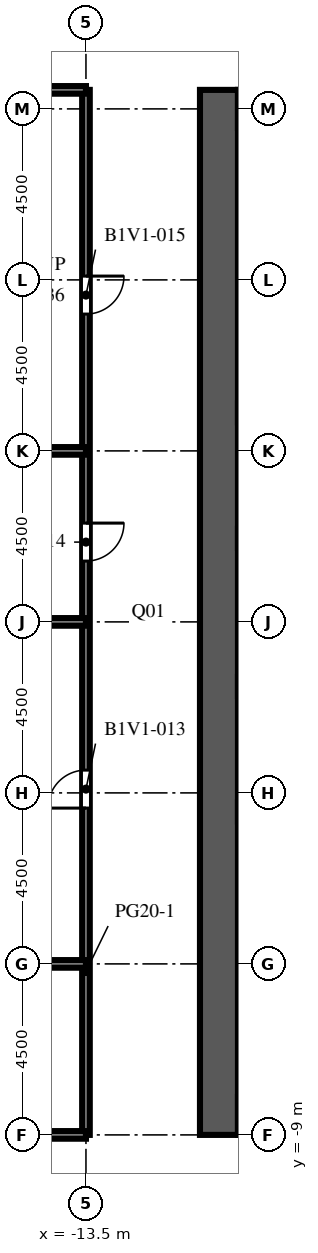
"""IFC4 building model, lengths in metres.
Left out: names, types, materials, properties, quantities, classifications, styles, units other than length and angle.
Written with IfcOpenShell. Run it as: python <this file> out.ifc"""

import sys

from ifc_helpers import new_model, si_unit, direction, frame, frame_2d, origin, place, context, subcontext, project, spatial, rectangle, extrude, element, fill, save


model = new_model("IFC4")
c1 = context("Model", 3, precision=1e-05, world=origin(), true_north=direction((0.0, 1.0)))
c2 = subcontext(c1, "Body", "Model", "MODEL_VIEW")
j1 = project(units=[si_unit("LENGTHUNIT", "METRE"), si_unit("PLANEANGLEUNIT", "RADIAN")], contexts=[c1])
p1 = place(None, origin())
s1 = spatial("IfcSite", under=j1, at=p1, CompositionType="ELEMENT")
p2 = place(p1, origin())
s2 = spatial("IfcBuilding", under=s1, at=p2, CompositionType="ELEMENT")
p3 = place(p2, frame((0.0, 0.0, 23.6)))
s3 = spatial("IfcBuildingStorey", under=s2, at=p3, CompositionType="ELEMENT", Elevation=23.6)
p4 = place(p3, frame((-10.0, -9.0, 0.0), z_axis=(0.0, 0.0, 1.0), x_axis=(0.0, 1.0, 0.0)))
e1 = element("IfcWall", 1, at=p4, inside=s3, PredefinedType="SHEAR", context=c2, shape_type="SweptSolid", body=[
    extrude(rectangle(XDim=27.5, YDim=1.0, at=frame_2d((13.75, 0.0))), origin(), (0.0, 0.0, 1.0), 4.1),
])
p5 = place(p4, frame((12.55, 0.0, 0.0)))
e2 = element("IfcOpeningElement", 2, at=p5, cuts=e1, PredefinedType="OPENING", context=c2, shape_type="SweptSolid", body=[
    extrude(rectangle(XDim=2.4, YDim=2.4, at=frame_2d((1.2, 1.2))), frame((0.0, 0.51, 0.0), z_axis=(0.0, -1.0, 0.0), x_axis=(1.0, 0.0, 0.0)), (0.0, 0.0, 1.0), 1.02),
])
p6 = place(p4, frame((6.825, 0.0, 0.0)))
e3 = element("IfcOpeningElement", 3, at=p6, cuts=e1, PredefinedType="OPENING", context=c2, shape_type="SweptSolid", body=[
    extrude(rectangle(XDim=1.2, YDim=2.1, at=frame_2d((0.6, 1.05))), frame((0.0, 0.51, 0.0), z_axis=(0.0, -1.0, 0.0), x_axis=(1.0, 0.0, 0.0)), (0.0, 0.0, 1.0), 1.02),
])
p7 = place(p4, frame((19.475, 0.0, 0.0)))
e4 = element("IfcOpeningElement", 4, at=p7, cuts=e1, PredefinedType="OPENING", context=c2, shape_type="SweptSolid", body=[
    extrude(rectangle(XDim=1.2, YDim=2.1, at=frame_2d((0.6, 1.05))), frame((0.0, 0.51, 0.0), z_axis=(0.0, -1.0, 0.0), x_axis=(1.0, 0.0, 0.0)), (0.0, 0.0, 1.0), 1.02),
])
p8 = place(p3, frame((-13.5, -9.0, 0.0), z_axis=(0.0, 0.0, 1.0), x_axis=(0.0, 1.0, 0.0)))
e5 = element("IfcWall", 5, at=p8, inside=s3, PredefinedType="PARTITIONING", context=c2, shape_type="SweptSolid", body=[
    extrude(rectangle(XDim=27.5, YDim=0.2, at=frame_2d((13.75, 0.0))), origin(), (0.0, 0.0, 1.0), 3.65),
])
p9 = place(p8, frame((8.6, 0.0, 0.0)))
e6 = element("IfcOpeningElement", 6, at=p9, cuts=e5, PredefinedType="OPENING", context=c2, shape_type="SweptSolid", body=[
    extrude(rectangle(XDim=1.0, YDim=2.1, at=frame_2d((0.5, 1.05))), frame((0.0, 0.11, 0.0), z_axis=(0.0, -1.0, 0.0), x_axis=(1.0, 0.0, 0.0)), (0.0, 0.0, 1.0), 0.22),
])
p10 = place(p8, frame((15.1, 0.0, 0.0)))
e7 = element("IfcOpeningElement", 7, at=p10, cuts=e5, PredefinedType="OPENING", context=c2, shape_type="SweptSolid", body=[
    extrude(rectangle(XDim=1.0, YDim=2.1, at=frame_2d((0.5, 1.05))), frame((0.0, 0.11, 0.0), z_axis=(0.0, -1.0, 0.0), x_axis=(1.0, 0.0, 0.0)), (0.0, 0.0, 1.0), 0.22),
])
p11 = place(p8, frame((21.6, 0.0, 0.0)))
e8 = element("IfcOpeningElement", 8, at=p11, cuts=e5, PredefinedType="OPENING", context=c2, shape_type="SweptSolid", body=[
    extrude(rectangle(XDim=1.0, YDim=2.1, at=frame_2d((0.5, 1.05))), frame((0.0, 0.11, 0.0), z_axis=(0.0, -1.0, 0.0), x_axis=(1.0, 0.0, 0.0)), (0.0, 0.0, 1.0), 0.22),
])
p12 = place(p3, frame((-17.2, -9.0, 0.0), z_axis=(0.0, 0.0, 1.0), x_axis=(1.0, 0.0, 0.0)))
e9 = element("IfcWall", 9, at=p12, inside=s3, PredefinedType="PARTITIONING", context=c2, shape_type="SweptSolid", body=[
    extrude(rectangle(XDim=3.7, YDim=0.2, at=frame_2d((1.85, 0.0))), origin(), (0.0, 0.0, 1.0), 3.65),
])
for number, where, z_axis, x_axis in (
    (10, (-26.3, -4.5, 0.0), (0.0, 0.0, 1.0), (1.0, 0.0, 0.0)),
    (11, (-26.3, 4.5, 0.0), (0.0, 0.0, 1.0), (1.0, 0.0, 0.0)),
):
    element("IfcWall", number, at=place(p3, frame(where, z_axis=z_axis, x_axis=x_axis)), inside=s3, PredefinedType="PARTITIONING", context=c2, shape_type="SweptSolid", body=[
        extrude(rectangle(XDim=12.8, YDim=0.2, at=frame_2d((6.4, 0.0))), origin(), (0.0, 0.0, 1.0), 3.65),
    ])
for number, where, z_axis, x_axis in (
    (12, (-17.2, 9.0, 0.0), (0.0, 0.0, 1.0), (1.0, 0.0, 0.0)),
    (13, (-17.2, 18.5, 0.0), (0.0, 0.0, 1.0), (1.0, 0.0, 0.0)),
):
    element("IfcWall", number, at=place(p3, frame(where, z_axis=z_axis, x_axis=x_axis)), inside=s3, PredefinedType="PARTITIONING", context=c2, shape_type="SweptSolid", body=[
        extrude(rectangle(XDim=3.7, YDim=0.2, at=frame_2d((1.85, 0.0))), origin(), (0.0, 0.0, 1.0), 3.65),
    ])
p13 = place(p5, origin())
e14 = element("IfcDoor", 14, at=p13, inside=s3, OperationType="DOUBLE_DOOR_DOUBLE_SWING", PredefinedType="DOOR", context=c2, shape_type="SweptSolid", body=[
    extrude(rectangle(XDim=2.4, YDim=2.4, at=frame_2d((1.2, 1.2))), frame((0.0, 0.025, 0.0), z_axis=(0.0, -1.0, 0.0), x_axis=(1.0, 0.0, 0.0)), (0.0, 0.0, 1.0), 0.05),
])
fill(e2, e14)
p14 = place(p6, origin())
e15 = element("IfcDoor", 15, at=p14, inside=s3, OperationType="SINGLE_SWING_LEFT", PredefinedType="DOOR", context=c2, shape_type="SweptSolid", body=[
    extrude(rectangle(XDim=1.2, YDim=2.1, at=frame_2d((0.6, 1.05))), frame((0.0, 0.025, 0.0), z_axis=(0.0, -1.0, 0.0), x_axis=(1.0, 0.0, 0.0)), (0.0, 0.0, 1.0), 0.05),
])
fill(e3, e15)
p15 = place(p7, origin())
e16 = element("IfcDoor", 16, at=p15, inside=s3, OperationType="SINGLE_SWING_LEFT", PredefinedType="DOOR", context=c2, shape_type="SweptSolid", body=[
    extrude(rectangle(XDim=1.2, YDim=2.1, at=frame_2d((0.6, 1.05))), frame((0.0, 0.025, 0.0), z_axis=(0.0, -1.0, 0.0), x_axis=(1.0, 0.0, 0.0)), (0.0, 0.0, 1.0), 0.05),
])
fill(e4, e16)
p16 = place(p9, origin())
e17 = element("IfcDoor", 17, at=p16, inside=s3, OperationType="SINGLE_SWING_LEFT", PredefinedType="DOOR", context=c2, shape_type="SweptSolid", body=[
    extrude(rectangle(XDim=1.0, YDim=2.1, at=frame_2d((0.5, 1.05))), frame((0.0, 0.025, 0.0), z_axis=(0.0, -1.0, 0.0), x_axis=(1.0, 0.0, 0.0)), (0.0, 0.0, 1.0), 0.05),
])
fill(e6, e17)
p17 = place(p10, origin())
e18 = element("IfcDoor", 18, at=p17, inside=s3, OperationType="SINGLE_SWING_RIGHT", PredefinedType="DOOR", context=c2, shape_type="SweptSolid", body=[
    extrude(rectangle(XDim=1.0, YDim=2.1, at=frame_2d((0.5, 1.05))), frame((0.0, 0.025, 0.0), z_axis=(0.0, -1.0, 0.0), x_axis=(1.0, 0.0, 0.0)), (0.0, 0.0, 1.0), 0.05),
])
fill(e7, e18)
p18 = place(p11, origin())
e19 = element("IfcDoor", 19, at=p18, inside=s3, OperationType="SINGLE_SWING_RIGHT", PredefinedType="DOOR", context=c2, shape_type="SweptSolid", body=[
    extrude(rectangle(XDim=1.0, YDim=2.1, at=frame_2d((0.5, 1.05))), frame((0.0, 0.025, 0.0), z_axis=(0.0, -1.0, 0.0), x_axis=(1.0, 0.0, 0.0)), (0.0, 0.0, 1.0), 0.05),
])
fill(e8, e19)
save(model, sys.argv[1])
